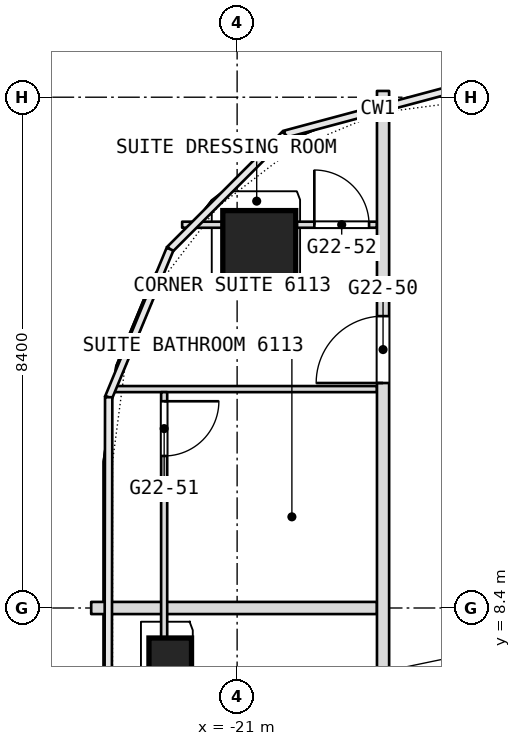
"""IFC4 building model, lengths in metres.
Left out: names, types, materials, properties, quantities, classifications, styles, units other than length and angle.
Written with IfcOpenShell. Run it as: python <this file> out.ifc"""

import sys

from ifc_helpers import new_model, si_unit, direction, frame, frame_2d, origin, origin_2d, place, context, subcontext, project, spatial, rectangle, extrude, element, fill, save


model = new_model("IFC4")
c1 = context("Model", 3, precision=1e-05, world=origin(), true_north=direction((0.0, 1.0)))
c2 = subcontext(c1, "Body", "Model", "MODEL_VIEW")
j1 = project(units=[si_unit("LENGTHUNIT", "METRE"), si_unit("PLANEANGLEUNIT", "RADIAN")], contexts=[c1])
p1 = place(None, origin())
s1 = spatial("IfcSite", under=j1, at=p1, CompositionType="ELEMENT")
p2 = place(p1, origin())
s2 = spatial("IfcBuilding", under=s1, at=p2, CompositionType="ELEMENT")
p3 = place(p2, frame((0.0, 0.0, 266.9)))
s3 = spatial("IfcBuildingStorey", under=s2, at=p3, CompositionType="ELEMENT", Elevation=266.9)
p4 = place(p3, frame((-20.635, 14.335, 0.0), z_axis=(0.0, 0.0, 1.0), x_axis=(1.0, 0.0, 0.0)))
e1 = element("IfcColumn", 1, at=p4, inside=s3, PredefinedType="COLUMN", context=c2, shape_type="SweptSolid", body=[
    extrude(rectangle(XDim=1.2, YDim=1.2, at=origin_2d()), origin(), (0.0, 0.0, 1.0), 3.6),
])
p5 = place(p3, frame((-22.1, 7.556, 0.0), z_axis=(0.0, 0.0, 1.0), x_axis=(1.0, 0.0, 0.0)))
e2 = element("IfcColumn", 2, at=p5, inside=s3, PredefinedType="COLUMN", context=c2, shape_type="SweptSolid", body=[
    extrude(rectangle(XDim=0.7, YDim=0.7, at=origin_2d()), origin(), (0.0, 0.0, 1.0), 3.6),
])
p6 = place(p3, frame((-23.4, 8.4, 0.0), z_axis=(0.0, 0.0, 1.0), x_axis=(1.0, 0.0, 0.0)))
e3 = element("IfcWall", 3, at=p6, inside=s3, PredefinedType="PARTITIONING", context=c2, shape_type="SweptSolid", body=[
    extrude(rectangle(XDim=4.7, YDim=0.2, at=frame_2d((2.35, 0.0))), origin(), (0.0, 0.0, 1.0), 3.0),
])
p7 = place(p3, frame((-23.027, 12.0, 0.0), z_axis=(0.0, 0.0, 1.0), x_axis=(1.0, 0.0, 0.0)))
e4 = element("IfcWall", 4, at=p7, inside=s3, PredefinedType="PARTITIONING", context=c2, shape_type="SweptSolid", body=[
    extrude(rectangle(XDim=4.327, YDim=0.1, at=frame_2d((2.164, 0.0))), origin(), (0.0, 0.0, 1.0), 3.34),
])
p8 = place(p3, frame((-21.904, 14.703, 0.0), z_axis=(0.0, 0.0, 1.0), x_axis=(1.0, 0.0, 0.0)))
e5 = element("IfcWall", 5, at=p8, inside=s3, PredefinedType="PARTITIONING", context=c2, shape_type="SweptSolid", body=[
    extrude(rectangle(XDim=0.668, YDim=0.1, at=frame_2d((0.334, 0.0))), origin(), (0.0, 0.0, 1.0), 3.34),
])
p9 = place(p3, frame((-20.035, 14.703, 0.0), z_axis=(0.0, 0.0, 1.0), x_axis=(1.0, 0.0, 0.0)))
e6 = element("IfcWall", 6, at=p9, inside=s3, PredefinedType="PARTITIONING", context=c2, shape_type="SweptSolid", body=[
    extrude(rectangle(XDim=1.335, YDim=0.1, at=frame_2d((0.667, 0.0))), origin(), (0.0, 0.0, 1.0), 3.34),
])
p10 = place(p9, frame((0.305, 0.0, 0.0)))
e7 = element("IfcOpeningElement", 7, at=p10, cuts=e6, PredefinedType="OPENING", context=c2, shape_type="SweptSolid", body=[
    extrude(rectangle(XDim=0.9, YDim=2.1, at=frame_2d((0.45, 1.05))), frame((0.0, 0.05, 0.0), z_axis=(0.0, -1.0, 0.0), x_axis=(1.0, 0.0, 0.0)), (0.0, 0.0, 1.0), 0.1),
])
p11 = place(p3, frame((-18.6, -31.794, 0.0), z_axis=(0.0, 0.0, 1.0), x_axis=(0.0, 1.0, 0.0)))
e8 = element("IfcWall", 8, at=p11, inside=s3, PredefinedType="PARTITIONING", context=c2, shape_type="SweptSolid", body=[
    extrude(rectangle(XDim=48.697, YDim=0.2, at=frame_2d((24.349, 0.0))), origin(), (0.0, 0.0, 1.0), 3.34),
])
p12 = place(p11, frame((5.274, 0.0, 0.0)))
e9 = element("IfcOpeningElement", 9, at=p12, cuts=e8, PredefinedType="OPENING", context=c2, shape_type="SweptSolid", body=[
    extrude(rectangle(XDim=1.0, YDim=2.1, at=frame_2d((0.5, 1.05))), frame((0.0, 0.1, 0.0), z_axis=(0.0, -1.0, 0.0), x_axis=(1.0, 0.0, 0.0)), (0.0, 0.0, 1.0), 0.2),
])
p13 = place(p11, frame((9.021, 0.0, 0.0)))
e10 = element("IfcOpeningElement", 10, at=p13, cuts=e8, PredefinedType="OPENING", context=c2, shape_type="SweptSolid", body=[
    extrude(rectangle(XDim=1.0, YDim=2.1, at=frame_2d((0.5, 1.05))), frame((0.0, 0.1, 0.0), z_axis=(0.0, -1.0, 0.0), x_axis=(1.0, 0.0, 0.0)), (0.0, 0.0, 1.0), 0.2),
])
p14 = place(p11, frame((18.294, 0.0, 0.0)))
e11 = element("IfcOpeningElement", 11, at=p14, cuts=e8, PredefinedType="OPENING", context=c2, shape_type="SweptSolid", body=[
    extrude(rectangle(XDim=1.8, YDim=2.1, at=frame_2d((0.9, 1.05))), frame((0.0, 0.1, 0.0), z_axis=(0.0, -1.0, 0.0), x_axis=(1.0, 0.0, 0.0)), (0.0, 0.0, 1.0), 0.2),
])
p15 = place(p11, frame((27.094, 0.0, 0.0)))
e12 = element("IfcOpeningElement", 12, at=p15, cuts=e8, PredefinedType="OPENING", context=c2, shape_type="SweptSolid", body=[
    extrude(rectangle(XDim=1.1, YDim=2.1, at=frame_2d((0.55, 1.05))), frame((0.0, 0.1, 0.0), z_axis=(0.0, -1.0, 0.0), x_axis=(1.0, 0.0, 0.0)), (0.0, 0.0, 1.0), 0.2),
])
p16 = place(p11, frame((35.394, 0.0, 0.0)))
e13 = element("IfcOpeningElement", 13, at=p16, cuts=e8, PredefinedType="OPENING", context=c2, shape_type="SweptSolid", body=[
    extrude(rectangle(XDim=1.1, YDim=2.1, at=frame_2d((0.55, 1.05))), frame((0.0, 0.1, 0.0), z_axis=(0.0, -1.0, 0.0), x_axis=(1.0, 0.0, 0.0)), (0.0, 0.0, 1.0), 0.2),
])
p17 = place(p11, frame((43.894, 0.0, 0.0)))
e14 = element("IfcOpeningElement", 14, at=p17, cuts=e8, PredefinedType="OPENING", context=c2, shape_type="SweptSolid", body=[
    extrude(rectangle(XDim=1.1, YDim=2.1, at=frame_2d((0.55, 1.05))), frame((0.0, 0.1, 0.0), z_axis=(0.0, -1.0, 0.0), x_axis=(1.0, 0.0, 0.0)), (0.0, 0.0, 1.0), 0.2),
])
p18 = place(p3, frame((-22.2, 4.75, 0.0), z_axis=(0.0, 0.0, 1.0), x_axis=(0.0, 1.0, 0.0)))
e15 = element("IfcWall", 15, at=p18, inside=s3, PredefinedType="PARTITIONING", context=c2, shape_type="SweptSolid", body=[
    extrude(rectangle(XDim=7.2, YDim=0.1, at=frame_2d((3.6, 0.0))), origin(), (0.0, 0.0, 1.0), 3.0),
])
p19 = place(p18, frame((6.15, 0.0, 0.0)))
e16 = element("IfcOpeningElement", 16, at=p19, cuts=e15, PredefinedType="OPENING", context=c2, shape_type="SweptSolid", body=[
    extrude(rectangle(XDim=0.9, YDim=2.1, at=frame_2d((0.45, 1.05))), frame((0.0, 0.05, 0.0), z_axis=(0.0, -1.0, 0.0), x_axis=(1.0, 0.0, 0.0)), (0.0, 0.0, 1.0), 0.1),
])
p20 = place(p10, origin())
e17 = element("IfcDoor", 17, at=p20, inside=s3, OperationType="SINGLE_SWING_LEFT", PredefinedType="DOOR", context=c2, shape_type="SweptSolid", body=[
    extrude(rectangle(XDim=0.9, YDim=2.1, at=frame_2d((0.45, 1.05))), frame((0.0, 0.025, 0.0), z_axis=(0.0, -1.0, 0.0), x_axis=(1.0, 0.0, 0.0)), (0.0, 0.0, 1.0), 0.05),
])
fill(e7, e17)
p21 = place(p17, origin())
e18 = element("IfcDoor", 18, at=p21, inside=s3, OperationType="SINGLE_SWING_LEFT", PredefinedType="DOOR", context=c2, shape_type="SweptSolid", body=[
    extrude(rectangle(XDim=1.1, YDim=2.1, at=frame_2d((0.55, 1.05))), frame((0.0, 0.025, 0.0), z_axis=(0.0, -1.0, 0.0), x_axis=(1.0, 0.0, 0.0)), (0.0, 0.0, 1.0), 0.05),
])
fill(e14, e18)
p22 = place(p19, origin())
e19 = element("IfcDoor", 19, at=p22, inside=s3, OperationType="SINGLE_SWING_LEFT", PredefinedType="DOOR", context=c2, shape_type="SweptSolid", body=[
    extrude(rectangle(XDim=0.9, YDim=2.1, at=frame_2d((0.45, 1.05))), frame((0.0, 0.025, 0.0), z_axis=(0.0, -1.0, 0.0), x_axis=(1.0, 0.0, 0.0)), (0.0, 0.0, 1.0), 0.05),
])
fill(e16, e19)
save(model, sys.argv[1])
